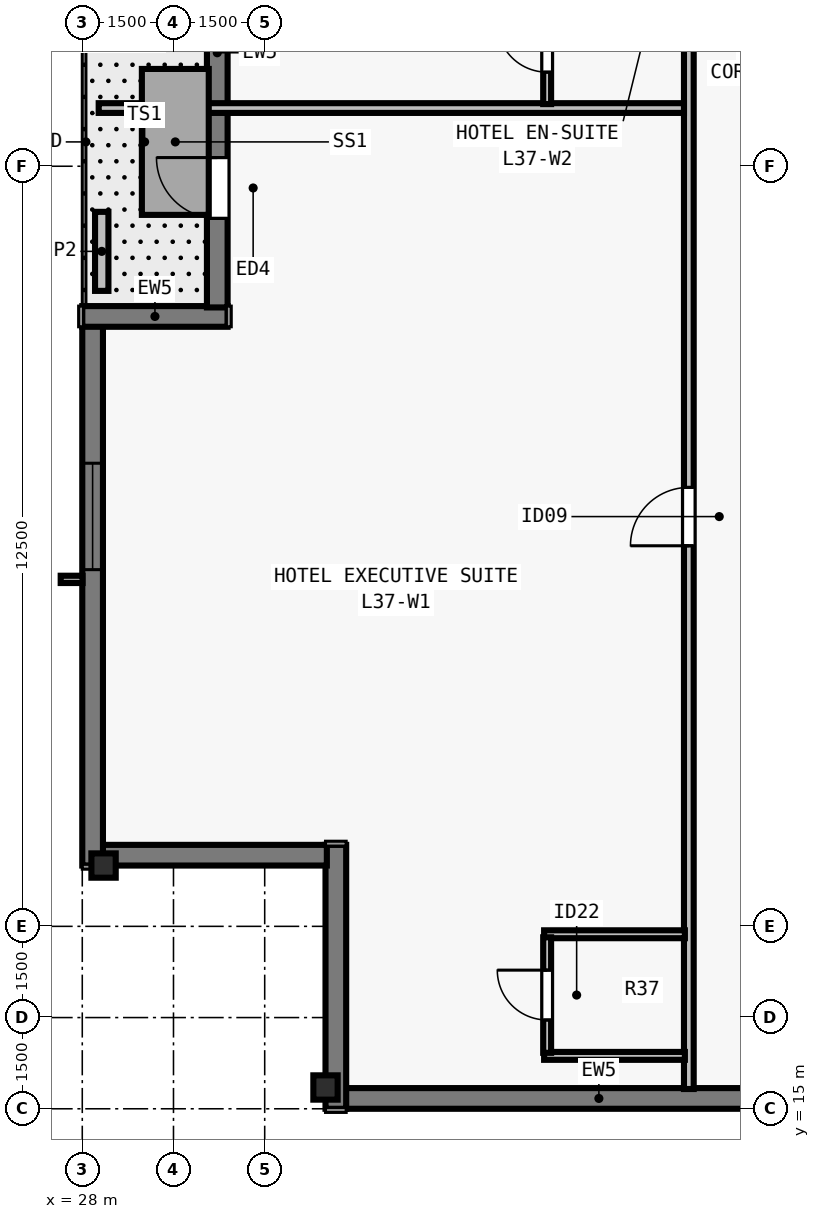
"""IFC4 building model, lengths in metres.
Left out: names, types, materials, properties, quantities, classifications, styles, units other than length and angle.
Written with IfcOpenShell. Run it as: python <this file> out.ifc"""

import sys

from ifc_helpers import new_model, si_unit, direction, frame, frame_2d, origin, origin_2d, place, context, subcontext, project, spatial, rectangle, i_section, extrude, element, fill, save


model = new_model("IFC4")
c1 = context("Model", 3, precision=1e-05, world=origin(), true_north=direction((0.0, 1.0)))
c2 = subcontext(c1, "Body", "Model", "MODEL_VIEW")
j1 = project(units=[si_unit("LENGTHUNIT", "METRE"), si_unit("PLANEANGLEUNIT", "RADIAN")], contexts=[c1])
p1 = place(None, origin())
s1 = spatial("IfcSite", under=j1, at=p1, CompositionType="ELEMENT")
p2 = place(p1, origin())
s2 = spatial("IfcBuilding", under=s1, at=p2, CompositionType="ELEMENT")
p3 = place(p2, frame((0.0, 0.0, 137.5)))
s3 = spatial("IfcBuildingStorey", under=s2, at=p3, CompositionType="ELEMENT", Elevation=137.5)
for number, where, z_axis, x_axis in (
    (1, (32.0, 15.35, 0.0), (0.0, 0.0, 1.0), (1.0, 0.0, 0.0)),
    (2, (28.35, 19.0, 0.0), (0.0, 0.0, 1.0), (0.0, 1.0, 0.0)),
):
    element("IfcColumn", number, at=place(p3, frame(where, z_axis=z_axis, x_axis=x_axis)), inside=s3, PredefinedType="COLUMN", context=c2, shape_type="SweptSolid", body=[
        extrude(i_section(OverallWidth=0.4, OverallDepth=0.4, WebThickness=0.022, FlangeThickness=0.036, at=origin_2d()), origin(), (0.0, 0.0, 1.0), 3.5),
    ])
p4 = place(p3, frame((72.0, 15.17, 0.0), z_axis=(0.0, 0.0, 1.0), x_axis=(-1.0, 0.0, 0.0)))
e3 = element("IfcWall", 3, at=p4, inside=s3, PredefinedType="SOLIDWALL", context=c2, shape_type="SweptSolid", body=[
    extrude(rectangle(XDim=39.682, YDim=0.34, at=frame_2d((19.841, 0.0))), origin(), (0.0, 0.0, 1.0), 3.28),
])
p5 = place(p4, frame((8.055, 0.0, 0.8)))
e4 = element("IfcOpeningElement", 4, at=p5, cuts=e3, PredefinedType="OPENING", context=c2, shape_type="SweptSolid", body=[
    extrude(rectangle(XDim=1.35, YDim=1.66, at=frame_2d((0.675, 0.83))), frame((0.0, 0.18, 0.0), z_axis=(0.0, -1.0, 0.0), x_axis=(1.0, 0.0, 0.0)), (0.0, 0.0, 1.0), 0.36),
])
p6 = place(p4, frame((11.859, 0.0, 0.8)))
e5 = element("IfcOpeningElement", 5, at=p6, cuts=e3, PredefinedType="OPENING", context=c2, shape_type="SweptSolid", body=[
    extrude(rectangle(XDim=1.75, YDim=1.66, at=frame_2d((0.875, 0.83))), frame((0.0, 0.18, 0.0), z_axis=(0.0, -1.0, 0.0), x_axis=(1.0, 0.0, 0.0)), (0.0, 0.0, 1.0), 0.36),
])
p7 = place(p4, frame((16.062, 0.0, 0.8)))
e6 = element("IfcOpeningElement", 6, at=p7, cuts=e3, PredefinedType="OPENING", context=c2, shape_type="SweptSolid", body=[
    extrude(rectangle(XDim=1.35, YDim=1.66, at=frame_2d((0.675, 0.83))), frame((0.0, 0.18, 0.0), z_axis=(0.0, -1.0, 0.0), x_axis=(1.0, 0.0, 0.0)), (0.0, 0.0, 1.0), 0.36),
])
p8 = place(p4, frame((18.966, 0.0, 0.8)))
e7 = element("IfcOpeningElement", 7, at=p8, cuts=e3, PredefinedType="OPENING", context=c2, shape_type="SweptSolid", body=[
    extrude(rectangle(XDim=1.75, YDim=1.66, at=frame_2d((0.875, 0.83))), frame((0.0, 0.18, 0.0), z_axis=(0.0, -1.0, 0.0), x_axis=(1.0, 0.0, 0.0)), (0.0, 0.0, 1.0), 0.36),
])
p9 = place(p4, frame((22.719, 0.0, 0.8)))
e8 = element("IfcOpeningElement", 8, at=p9, cuts=e3, PredefinedType="OPENING", context=c2, shape_type="SweptSolid", body=[
    extrude(rectangle(XDim=1.35, YDim=1.66, at=frame_2d((0.675, 0.83))), frame((0.0, 0.18, 0.0), z_axis=(0.0, -1.0, 0.0), x_axis=(1.0, 0.0, 0.0)), (0.0, 0.0, 1.0), 0.36),
])
p10 = place(p4, frame((26.523, 0.0, 0.8)))
e9 = element("IfcOpeningElement", 9, at=p10, cuts=e3, PredefinedType="OPENING", context=c2, shape_type="SweptSolid", body=[
    extrude(rectangle(XDim=1.75, YDim=1.66, at=frame_2d((0.875, 0.83))), frame((0.0, 0.18, 0.0), z_axis=(0.0, -1.0, 0.0), x_axis=(1.0, 0.0, 0.0)), (0.0, 0.0, 1.0), 0.36),
])
p11 = place(p4, frame((29.827, 0.0, 0.8)))
e10 = element("IfcOpeningElement", 10, at=p11, cuts=e3, PredefinedType="OPENING", context=c2, shape_type="SweptSolid", body=[
    extrude(rectangle(XDim=1.35, YDim=1.66, at=frame_2d((0.675, 0.83))), frame((0.0, 0.18, 0.0), z_axis=(0.0, -1.0, 0.0), x_axis=(1.0, 0.0, 0.0)), (0.0, 0.0, 1.0), 0.36),
])
p12 = place(p3, frame((32.17, 15.0, 0.0), z_axis=(0.0, 0.0, 1.0), x_axis=(0.0, 1.0, 0.0)))
e11 = element("IfcWall", 11, at=p12, inside=s3, PredefinedType="SOLIDWALL", context=c2, shape_type="SweptSolid", body=[
    extrude(rectangle(XDim=4.34, YDim=0.34, at=frame_2d((2.17, 0.0))), origin(), (0.0, 0.0, 1.0), 3.28),
])
p13 = place(p3, frame((32.022, 19.17, 0.0), z_axis=(0.0, 0.0, 1.0), x_axis=(-1.0, 0.0, 0.0)))
e12 = element("IfcWall", 12, at=p13, inside=s3, PredefinedType="SOLIDWALL", context=c2, shape_type="SweptSolid", body=[
    extrude(rectangle(XDim=3.704, YDim=0.34, at=frame_2d((1.852, 0.0))), origin(), (0.0, 0.0, 1.0), 3.28),
])
p14 = place(p3, frame((28.17, 19.0, 0.0), z_axis=(0.0, 0.0, 1.0), x_axis=(0.0, 1.0, 0.0)))
e13 = element("IfcWall", 13, at=p14, inside=s3, PredefinedType="SOLIDWALL", context=c2, shape_type="SweptSolid", body=[
    extrude(rectangle(XDim=8.882, YDim=0.34, at=frame_2d((4.441, 0.0))), origin(), (0.0, 0.0, 1.0), 3.28),
])
p15 = place(p14, frame((4.866, 0.0, 0.8)))
e14 = element("IfcOpeningElement", 14, at=p15, cuts=e13, PredefinedType="OPENING", context=c2, shape_type="SweptSolid", body=[
    extrude(rectangle(XDim=1.75, YDim=1.66, at=frame_2d((0.875, 0.83))), frame((0.0, 0.18, 0.0), z_axis=(0.0, -1.0, 0.0), x_axis=(1.0, 0.0, 0.0)), (0.0, 0.0, 1.0), 0.36),
])
p16 = place(p3, frame((28.0, 28.03, 0.0), z_axis=(0.0, 0.0, 1.0), x_axis=(1.0, 0.0, 0.0)))
e15 = element("IfcWall", 15, at=p16, inside=s3, PredefinedType="SOLIDWALL", context=c2, shape_type="SweptSolid", body=[
    extrude(rectangle(XDim=2.39, YDim=0.34, at=frame_2d((1.195, 0.0))), origin(), (0.0, 0.0, 1.0), 3.28),
])
p17 = place(p3, frame((30.22, 28.178, 0.0), z_axis=(0.0, 0.0, 1.0), x_axis=(0.0, 1.0, 0.0)))
e16 = element("IfcWall", 16, at=p17, inside=s3, PredefinedType="SOLIDWALL", context=c2, shape_type="SweptSolid", body=[
    extrude(rectangle(XDim=5.762, YDim=0.34, at=frame_2d((2.881, 0.0))), origin(), (0.0, 0.0, 1.0), 3.28),
])
p18 = place(p17, frame((1.465, 0.0, 0.0)))
e17 = element("IfcOpeningElement", 17, at=p18, cuts=e16, PredefinedType="OPENING", context=c2, shape_type="SweptSolid", body=[
    extrude(rectangle(XDim=1.0, YDim=2.15, at=frame_2d((0.5, 1.075))), frame((0.0, 0.18, 0.0), z_axis=(0.0, -1.0, 0.0), x_axis=(1.0, 0.0, 0.0)), (0.0, 0.0, 1.0), 0.36),
])
p19 = place(p3, frame((28.32, 28.45, 0.0), z_axis=(0.0, 0.0, 1.0), x_axis=(0.0, 1.0, 0.0)))
e18 = element("IfcWall", 18, at=p19, inside=s3, PredefinedType="PARAPET", context=c2, shape_type="SweptSolid", body=[
    extrude(rectangle(XDim=1.3, YDim=0.22, at=frame_2d((0.65, 0.0))), origin(), (0.0, 0.0, 1.0), 0.55),
])
p20 = place(p3, frame((37.975, 15.325, 0.0), z_axis=(0.0, 0.0, 1.0), x_axis=(0.0, 1.0, 0.0)))
e19 = element("IfcWall", 19, at=p20, inside=s3, PredefinedType="PARTITIONING", context=c2, shape_type="SweptSolid", body=[
    extrude(rectangle(XDim=47.35, YDim=0.16, at=frame_2d((23.675, 0.0))), origin(), (0.0, 0.0, 1.0), 2.555),
])
p21 = place(p20, frame((8.934, 0.0, 0.0)))
e20 = element("IfcOpeningElement", 20, at=p21, cuts=e19, PredefinedType="OPENING", context=c2, shape_type="SweptSolid", body=[
    extrude(rectangle(XDim=0.96, YDim=2.15, at=frame_2d((0.48, 1.075))), frame((0.0, 0.09, 0.0), z_axis=(0.0, -1.0, 0.0), x_axis=(1.0, 0.0, 0.0)), (0.0, 0.0, 1.0), 0.18),
])
p22 = place(p20, frame((24.319, 0.0, 0.0)))
e21 = element("IfcOpeningElement", 21, at=p22, cuts=e19, PredefinedType="OPENING", context=c2, shape_type="SweptSolid", body=[
    extrude(rectangle(XDim=0.96, YDim=2.15, at=frame_2d((0.48, 1.075))), frame((0.0, 0.09, 0.0), z_axis=(0.0, -1.0, 0.0), x_axis=(1.0, 0.0, 0.0)), (0.0, 0.0, 1.0), 0.18),
])
p23 = place(p20, frame((39.88, 0.0, 0.0)))
e22 = element("IfcOpeningElement", 22, at=p23, cuts=e19, PredefinedType="OPENING", context=c2, shape_type="SweptSolid", body=[
    extrude(rectangle(XDim=0.96, YDim=2.15, at=frame_2d((0.48, 1.075))), frame((0.0, 0.09, 0.0), z_axis=(0.0, -1.0, 0.0), x_axis=(1.0, 0.0, 0.0)), (0.0, 0.0, 1.0), 0.18),
])
for number, where, z_axis, x_axis in (
    (23, (35.595, 15.87, 0.0), (0.0, 0.0, 1.0), (1.0, 0.0, 0.0)),
    (24, (35.595, 17.87, 0.0), (0.0, 0.0, 1.0), (1.0, 0.0, 0.0)),
):
    element("IfcWall", number, at=place(p3, frame(where, z_axis=z_axis, x_axis=x_axis)), inside=s3, PredefinedType="PLUMBINGWALL", context=c2, shape_type="SweptSolid", body=[
        extrude(rectangle(XDim=2.315, YDim=0.13, at=frame_2d((1.157, 0.0))), origin(), (0.0, 0.0, 1.0), 3.28),
    ])
p24 = place(p3, frame((35.645, 15.92, 0.0), z_axis=(0.0, 0.0, 1.0), x_axis=(0.0, 1.0, 0.0)))
e25 = element("IfcWall", 25, at=p24, inside=s3, PredefinedType="PLUMBINGWALL", context=c2, shape_type="SweptSolid", body=[
    extrude(rectangle(XDim=1.9, YDim=0.13, at=frame_2d((0.95, 0.0))), origin(), (0.0, 0.0, 1.0), 3.28),
])
p25 = place(p24, frame((0.54, 0.0, 0.0)))
e26 = element("IfcOpeningElement", 26, at=p25, cuts=e25, PredefinedType="OPENING", context=c2, shape_type="SweptSolid", body=[
    extrude(rectangle(XDim=0.82, YDim=2.1, at=frame_2d((0.41, 1.05))), frame((0.0, 0.075, 0.0), z_axis=(0.0, -1.0, 0.0), x_axis=(1.0, 0.0, 0.0)), (0.0, 0.0, 1.0), 0.15),
])
p26 = place(p3, frame((28.27, 31.457, 0.0), z_axis=(0.0, 0.0, 1.0), x_axis=(1.0, 0.0, 0.0)))
e27 = element("IfcWall", 27, at=p26, inside=s3, PredefinedType="PARTITIONING", context=c2, shape_type="SweptSolid", body=[
    extrude(rectangle(XDim=9.625, YDim=0.16, at=frame_2d((4.812, 0.0))), origin(), (0.0, 0.0, 1.0), 3.28),
])
p27 = place(p3, frame((35.645, 31.522, 0.0), z_axis=(0.0, 0.0, 1.0), x_axis=(0.0, 1.0, 0.0)))
e28 = element("IfcWall", 28, at=p27, inside=s3, PredefinedType="PLUMBINGWALL", context=c2, shape_type="SweptSolid", body=[
    extrude(rectangle(XDim=1.885, YDim=0.13, at=frame_2d((0.942, 0.0))), origin(), (0.0, 0.0, 1.0), 3.28),
])
p28 = place(p27, frame((0.525, 0.0, 0.0)))
e29 = element("IfcOpeningElement", 29, at=p28, cuts=e28, PredefinedType="OPENING", context=c2, shape_type="SweptSolid", body=[
    extrude(rectangle(XDim=0.82, YDim=2.1, at=frame_2d((0.41, 1.05))), frame((0.0, 0.075, 0.0), z_axis=(0.0, -1.0, 0.0), x_axis=(1.0, 0.0, 0.0)), (0.0, 0.0, 1.0), 0.15),
])
p29 = place(p15, origin())
e30 = element("IfcWindow", 30, at=p29, inside=s3, PartitioningType="SINGLE_PANEL", PredefinedType="WINDOW", context=c2, shape_type="SweptSolid", body=[
    extrude(rectangle(XDim=1.75, YDim=1.66, at=frame_2d((0.875, 0.83))), frame((0.0, -0.05, 0.0), z_axis=(0.0, -1.0, 0.0), x_axis=(1.0, 0.0, 0.0)), (0.0, 0.0, 1.0), 0.06),
])
fill(e14, e30)
p30 = place(p18, origin())
e31 = element("IfcDoor", 31, at=p30, inside=s3, OperationType="SINGLE_SWING_RIGHT", PredefinedType="DOOR", context=c2, shape_type="SweptSolid", body=[
    extrude(rectangle(XDim=1.0, YDim=2.15, at=frame_2d((0.5, 1.075))), frame((0.0, 0.025, 0.0), z_axis=(0.0, -1.0, 0.0), x_axis=(1.0, 0.0, 0.0)), (0.0, 0.0, 1.0), 0.05),
])
fill(e17, e31)
p31 = place(p25, origin())
e32 = element("IfcDoor", 32, at=p31, inside=s3, OperationType="SINGLE_SWING_RIGHT", PredefinedType="DOOR", context=c2, shape_type="SweptSolid", body=[
    extrude(rectangle(XDim=0.82, YDim=2.1, at=frame_2d((0.41, 1.05))), frame((0.0, 0.025, 0.0), z_axis=(0.0, -1.0, 0.0), x_axis=(1.0, 0.0, 0.0)), (0.0, 0.0, 1.0), 0.05),
])
fill(e26, e32)
p32 = place(p21, origin())
e33 = element("IfcDoor", 33, at=p32, inside=s3, OperationType="SINGLE_SWING_LEFT", PredefinedType="DOOR", context=c2, shape_type="SweptSolid", body=[
    extrude(rectangle(XDim=0.96, YDim=2.15, at=frame_2d((0.48, 1.075))), frame((0.0, 0.025, 0.0), z_axis=(0.0, -1.0, 0.0), x_axis=(1.0, 0.0, 0.0)), (0.0, 0.0, 1.0), 0.05),
])
fill(e20, e33)
p33 = place(p28, origin())
e34 = element("IfcDoor", 34, at=p33, inside=s3, OperationType="SINGLE_SWING_RIGHT", PredefinedType="DOOR", context=c2, shape_type="SweptSolid", body=[
    extrude(rectangle(XDim=0.82, YDim=2.1, at=frame_2d((0.41, 1.05))), frame((0.0, 0.025, 0.0), z_axis=(0.0, -1.0, 0.0), x_axis=(1.0, 0.0, 0.0)), (0.0, 0.0, 1.0), 0.05),
])
fill(e29, e34)
save(model, sys.argv[1])
